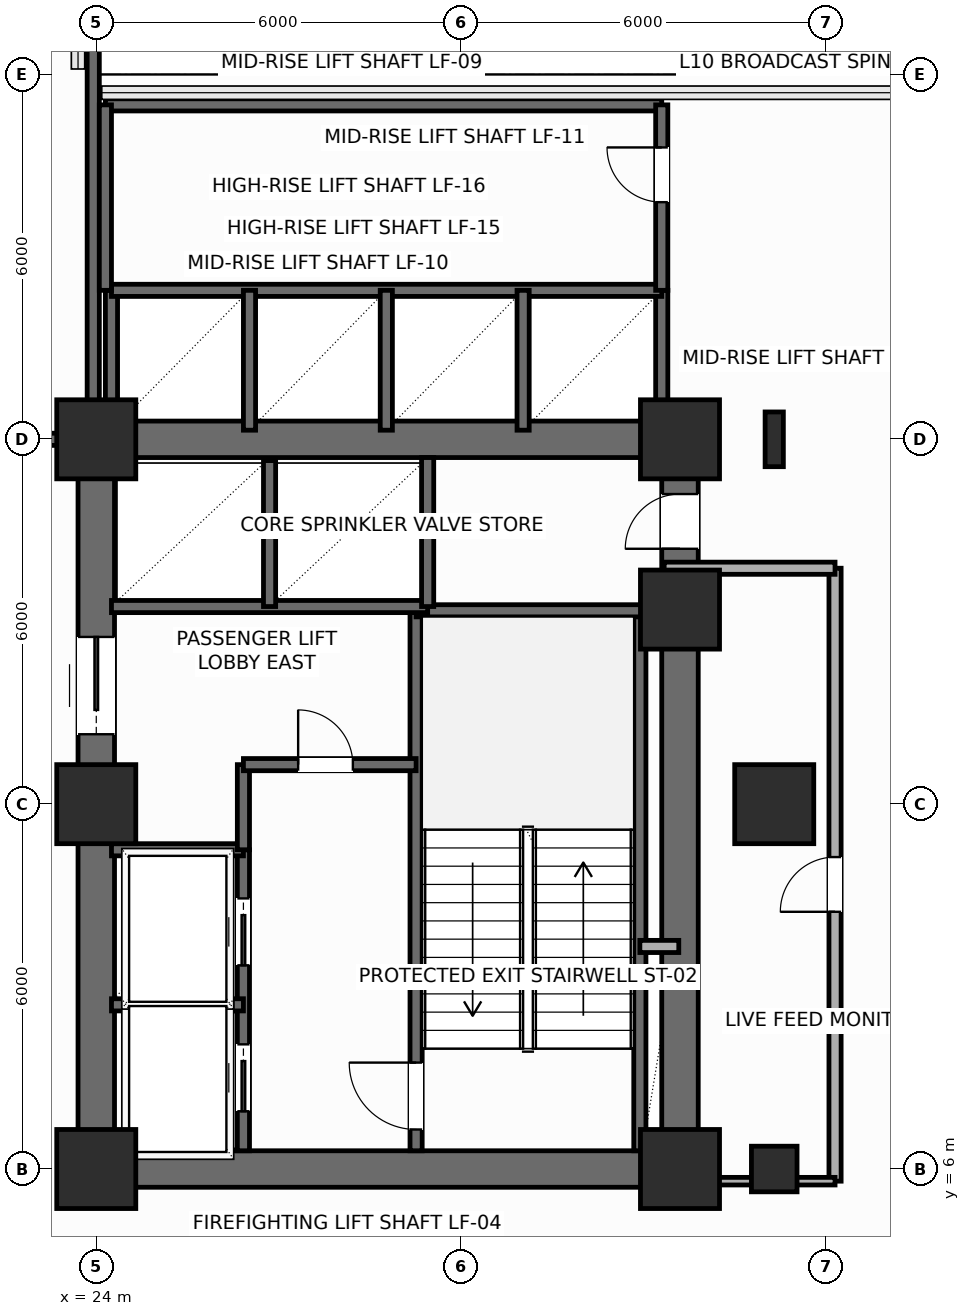
"""IFC4 building model, lengths in metres.
Left out: names, types, materials, properties, quantities, classifications, styles, units other than length and angle.
Written with IfcOpenShell. Run it as: python <this file> out.ifc"""

import sys

from ifc_helpers import new_model, si_unit, direction, frame, frame_2d, origin, origin_2d, place, context, subcontext, project, spatial, rectangle, hollow_rectangle, i_section, extrude, element, fill, save


model = new_model("IFC4")
c1 = context("Model", 3, precision=1e-05, world=origin(), true_north=direction((0.0, 1.0)))
c2 = subcontext(c1, "Body", "Model", "MODEL_VIEW")
j1 = project(units=[si_unit("LENGTHUNIT", "METRE"), si_unit("PLANEANGLEUNIT", "RADIAN")], contexts=[c1])
p1 = place(None, origin())
s1 = spatial("IfcSite", under=j1, at=p1, CompositionType="ELEMENT")
p2 = place(p1, origin())
s2 = spatial("IfcBuilding", under=s1, at=p2, CompositionType="ELEMENT")
p3 = place(p2, frame((0.0, 0.0, 48.0)))
s3 = spatial("IfcBuildingStorey", under=s2, at=p3, CompositionType="ELEMENT", Elevation=48.0)
for number, where, z_axis, x_axis in (
    (1, (24.0, 6.0, 0.0), (0.0, 0.0, 1.0), (1.0, 0.0, 0.0)),
    (2, (24.0, 12.0, 0.0), (0.0, 0.0, 1.0), (1.0, 0.0, 0.0)),
    (3, (24.0, 18.0, 0.0), (0.0, 0.0, 1.0), (1.0, 0.0, 0.0)),
    (4, (33.6, 6.0, 0.0), (0.0, 0.0, 1.0), (1.0, 0.0, 0.0)),
    (5, (33.6, 15.2, 0.0), (0.0, 0.0, 1.0), (1.0, 0.0, 0.0)),
    (6, (33.6, 18.0, 0.0), (0.0, 0.0, 1.0), (1.0, 0.0, 0.0)),
):
    element("IfcColumn", number, at=place(p3, frame(where, z_axis=z_axis, x_axis=x_axis)), inside=s3, PredefinedType="COLUMN", context=c2, shape_type="SweptSolid", body=[
        extrude(rectangle(XDim=1.3, YDim=1.3, at=origin_2d()), origin(), (0.0, 0.0, 1.0), 3.9),
    ])
p4 = place(p3, frame((35.15, 6.0, 0.0), z_axis=(0.0, 0.0, 1.0), x_axis=(1.0, 0.0, 0.0)))
e7 = element("IfcColumn", 7, at=p4, inside=s3, PredefinedType="COLUMN", context=c2, shape_type="SweptSolid", body=[
    extrude(hollow_rectangle(XDim=0.75, YDim=0.75, WallThickness=0.035, InnerFilletRadius=0.035, OuterFilletRadius=0.05, at=origin_2d()), origin(), (0.0, 0.0, 1.0), 3.9),
])
p5 = place(p3, frame((35.15, 12.0, 0.0), z_axis=(0.0, 0.0, 1.0), x_axis=(1.0, 0.0, 0.0)))
e8 = element("IfcColumn", 8, at=p5, inside=s3, PredefinedType="COLUMN", context=c2, shape_type="SweptSolid", body=[
    extrude(rectangle(XDim=1.3, YDim=1.3, at=origin_2d()), origin(), (0.0, 0.0, 1.0), 3.9),
])
p6 = place(p3, frame((35.15, 18.0, 0.0), z_axis=(0.0, 0.0, 1.0), x_axis=(1.0, 0.0, 0.0)))
e9 = element("IfcColumn", 9, at=p6, inside=s3, PredefinedType="COLUMN", context=c2, shape_type="SweptSolid", body=[
    extrude(i_section(OverallWidth=0.3, OverallDepth=0.9, WebThickness=0.019, FlangeThickness=0.035, FilletRadius=0.03, at=origin_2d()), origin(), (0.0, 0.0, 1.0), 3.9),
])
for number, where, z_axis, x_axis in (
    (10, (24.0, 6.0, 0.0), (0.0, 0.0, 1.0), (1.0, 0.0, 0.0)),
    (11, (24.0, 18.0, 0.0), (0.0, 0.0, 1.0), (1.0, 0.0, 0.0)),
):
    element("IfcWall", number, at=place(p3, frame(where, z_axis=z_axis, x_axis=x_axis)), inside=s3, PredefinedType="SHEAR", context=c2, shape_type="SweptSolid", body=[
        extrude(rectangle(XDim=9.6, YDim=0.6, at=frame_2d((4.8, 0.0))), origin(), (0.0, 0.0, 1.0), 3.65),
    ])
p7 = place(p3, frame((24.0, 6.0, 0.0), z_axis=(0.0, 0.0, 1.0), x_axis=(0.0, 1.0, 0.0)))
e12 = element("IfcWall", 12, at=p7, inside=s3, PredefinedType="SHEAR", context=c2, shape_type="SweptSolid", body=[
    extrude(rectangle(XDim=12.0, YDim=0.6, at=frame_2d((6.0, 0.0))), origin(), (0.0, 0.0, 1.0), 3.65),
])
p8 = place(p7, frame((7.15, 0.0, 0.0)))
e13 = element("IfcOpeningElement", 13, at=p8, cuts=e12, PredefinedType="OPENING", context=c2, shape_type="SweptSolid", body=[
    extrude(rectangle(XDim=1.6, YDim=2.3, at=frame_2d((0.8, 1.15))), frame((0.0, 0.31, 0.0), z_axis=(0.0, -1.0, 0.0), x_axis=(1.0, 0.0, 0.0)), (0.0, 0.0, 1.0), 0.62),
])
p9 = place(p3, frame((33.6, 6.0, 0.0), z_axis=(0.0, 0.0, 1.0), x_axis=(0.0, 1.0, 0.0)))
e14 = element("IfcWall", 14, at=p9, inside=s3, PredefinedType="SHEAR", context=c2, shape_type="SweptSolid", body=[
    extrude(rectangle(XDim=12.0, YDim=0.6, at=frame_2d((6.0, 0.0))), origin(), (0.0, 0.0, 1.0), 3.65),
])
p10 = place(p9, frame((10.2, 0.0, 0.0)))
e15 = element("IfcOpeningElement", 15, at=p10, cuts=e14, PredefinedType="OPENING", context=c2, shape_type="SweptSolid", body=[
    extrude(rectangle(XDim=0.9, YDim=2.15, at=frame_2d((0.45, 1.075))), frame((0.0, 0.31, 0.0), z_axis=(0.0, -1.0, 0.0), x_axis=(1.0, 0.0, 0.0)), (0.0, 0.0, 1.0), 0.62),
])
p11 = place(p3, frame((29.26, 6.3, 0.0), z_axis=(0.0, 0.0, 1.0), x_axis=(0.0, 1.0, 0.0)))
e16 = element("IfcWall", 16, at=p11, inside=s3, PredefinedType="SHEAR", context=c2, shape_type="SweptSolid", body=[
    extrude(rectangle(XDim=8.88, YDim=0.2, at=frame_2d((4.44, 0.0))), origin(), (0.0, 0.0, 1.0), 3.65),
])
p12 = place(p11, frame((0.35, 0.0, 0.0)))
e17 = element("IfcOpeningElement", 17, at=p12, cuts=e16, PredefinedType="OPENING", context=c2, shape_type="SweptSolid", body=[
    extrude(rectangle(XDim=1.1, YDim=2.2, at=frame_2d((0.55, 1.1))), frame((0.0, 0.11, 0.0), z_axis=(0.0, -1.0, 0.0), x_axis=(1.0, 0.0, 0.0)), (0.0, 0.0, 1.0), 0.22),
])
p13 = place(p3, frame((32.94, 6.3, 0.0), z_axis=(0.0, 0.0, 1.0), x_axis=(0.0, 1.0, 0.0)))
e18 = element("IfcWall", 18, at=p13, inside=s3, PredefinedType="SHEAR", context=c2, shape_type="SweptSolid", body=[
    extrude(rectangle(XDim=8.88, YDim=0.2, at=frame_2d((4.44, 0.0))), origin(), (0.0, 0.0, 1.0), 3.65),
])
p14 = place(p3, frame((29.26, 15.18, 0.0), z_axis=(0.0, 0.0, 1.0), x_axis=(1.0, 0.0, 0.0)))
e19 = element("IfcWall", 19, at=p14, inside=s3, PredefinedType="SHEAR", context=c2, shape_type="SweptSolid", body=[
    extrude(rectangle(XDim=4.04, YDim=0.2, at=frame_2d((2.02, 0.0))), origin(), (0.0, 0.0, 1.0), 3.65),
])
p15 = place(p3, frame((26.42, 6.3, 0.0), z_axis=(0.0, 0.0, 1.0), x_axis=(0.0, 1.0, 0.0)))
e20 = element("IfcWall", 20, at=p15, inside=s3, PredefinedType="SHEAR", context=c2, shape_type="SweptSolid", body=[
    extrude(rectangle(XDim=4.95, YDim=0.2, at=frame_2d((2.475, 0.0))), origin(), (0.0, 0.0, 1.0), 3.65),
])
p16 = place(p15, frame((0.65, 0.0, 0.0)))
e21 = element("IfcOpeningElement", 21, at=p16, cuts=e20, PredefinedType="OPENING", context=c2, shape_type="SweptSolid", body=[
    extrude(rectangle(XDim=1.1, YDim=2.2, at=frame_2d((0.55, 1.1))), frame((0.0, 0.11, 0.0), z_axis=(0.0, -1.0, 0.0), x_axis=(1.0, 0.0, 0.0)), (0.0, 0.0, 1.0), 0.22),
])
p17 = place(p15, frame((3.05, 0.0, 0.0)))
e22 = element("IfcOpeningElement", 22, at=p17, cuts=e20, PredefinedType="OPENING", context=c2, shape_type="SweptSolid", body=[
    extrude(rectangle(XDim=1.1, YDim=2.2, at=frame_2d((0.55, 1.1))), frame((0.0, 0.11, 0.0), z_axis=(0.0, -1.0, 0.0), x_axis=(1.0, 0.0, 0.0)), (0.0, 0.0, 1.0), 0.22),
])
for number, where, z_axis, x_axis in (
    (23, (24.25, 8.7, 0.0), (0.0, 0.0, 1.0), (1.0, 0.0, 0.0)),
    (24, (24.25, 11.25, 0.0), (0.0, 0.0, 1.0), (1.0, 0.0, 0.0)),
):
    element("IfcWall", number, at=place(p3, frame(where, z_axis=z_axis, x_axis=x_axis)), inside=s3, PredefinedType="SHEAR", context=c2, shape_type="SweptSolid", body=[
        extrude(rectangle(XDim=2.17, YDim=0.2, at=frame_2d((1.085, 0.0))), origin(), (0.0, 0.0, 1.0), 3.65),
    ])
p18 = place(p3, frame((26.42, 11.25, 0.0), z_axis=(0.0, 0.0, 1.0), x_axis=(0.0, 1.0, 0.0)))
e25 = element("IfcWall", 25, at=p18, inside=s3, PredefinedType="SHEAR", context=c2, shape_type="SweptSolid", body=[
    extrude(rectangle(XDim=1.4, YDim=0.2, at=frame_2d((0.7, 0.0))), origin(), (0.0, 0.0, 1.0), 3.65),
])
p19 = place(p3, frame((26.42, 12.65, 0.0), z_axis=(0.0, 0.0, 1.0), x_axis=(1.0, 0.0, 0.0)))
e26 = element("IfcWall", 26, at=p19, inside=s3, PredefinedType="SHEAR", context=c2, shape_type="SweptSolid", body=[
    extrude(rectangle(XDim=2.84, YDim=0.2, at=frame_2d((1.42, 0.0))), origin(), (0.0, 0.0, 1.0), 3.65),
])
p20 = place(p19, frame((0.9, 0.0, 0.0)))
e27 = element("IfcOpeningElement", 27, at=p20, cuts=e26, PredefinedType="OPENING", context=c2, shape_type="SweptSolid", body=[
    extrude(rectangle(XDim=0.9, YDim=2.15, at=frame_2d((0.45, 1.075))), frame((0.0, 0.11, 0.0), z_axis=(0.0, -1.0, 0.0), x_axis=(1.0, 0.0, 0.0)), (0.0, 0.0, 1.0), 0.22),
])
p21 = place(p3, frame((32.94, 9.66, 0.0), z_axis=(0.0, 0.0, 1.0), x_axis=(1.0, 0.0, 0.0)))
e28 = element("IfcWall", 28, at=p21, inside=s3, PredefinedType="SOLIDWALL", context=c2, shape_type="SweptSolid", body=[
    extrude(rectangle(XDim=0.64, YDim=0.2, at=frame_2d((0.32, 0.0))), origin(), (0.0, 0.0, 1.0), 3.65),
])
p22 = place(p3, frame((24.25, 15.25, 0.0), z_axis=(0.0, 0.0, 1.0), x_axis=(1.0, 0.0, 0.0)))
e29 = element("IfcWall", 29, at=p22, inside=s3, PredefinedType="SHEAR", context=c2, shape_type="SweptSolid", body=[
    extrude(rectangle(XDim=5.2, YDim=0.2, at=frame_2d((2.6, 0.0))), origin(), (0.0, 0.0, 1.0), 3.65),
])
p23 = place(p3, frame((26.85, 15.25, 0.0), z_axis=(0.0, 0.0, 1.0), x_axis=(0.0, 1.0, 0.0)))
e30 = element("IfcWall", 30, at=p23, inside=s3, PredefinedType="SHEAR", context=c2, shape_type="SweptSolid", body=[
    extrude(rectangle(XDim=2.4, YDim=0.2, at=frame_2d((1.2, 0.0))), origin(), (0.0, 0.0, 1.0), 3.65),
])
p24 = place(p3, frame((29.45, 15.25, 0.0), z_axis=(0.0, 0.0, 1.0), x_axis=(0.0, 1.0, 0.0)))
e31 = element("IfcWall", 31, at=p24, inside=s3, PredefinedType="SHEAR", context=c2, shape_type="SweptSolid", body=[
    extrude(rectangle(XDim=2.45, YDim=0.2, at=frame_2d((1.225, 0.0))), origin(), (0.0, 0.0, 1.0), 3.65),
])
p25 = place(p3, frame((20.45, 18.0, 0.0), z_axis=(0.0, 0.0, 1.0), x_axis=(1.0, 0.0, 0.0)))
e32 = element("IfcWall", 32, at=p25, inside=s3, PredefinedType="SHEAR", context=c2, shape_type="SweptSolid", body=[
    extrude(rectangle(XDim=3.5, YDim=0.2, at=frame_2d((1.75, 0.0))), origin(), (0.0, 0.0, 1.0), 3.65),
])
p26 = place(p25, frame((0.95, 0.0, 0.0)))
e33 = element("IfcOpeningElement", 33, at=p26, cuts=e32, PredefinedType="OPENING", context=c2, shape_type="SweptSolid", body=[
    extrude(rectangle(XDim=1.6, YDim=2.3, at=frame_2d((0.8, 1.15))), frame((0.0, 0.11, 0.0), z_axis=(0.0, -1.0, 0.0), x_axis=(1.0, 0.0, 0.0)), (0.0, 0.0, 1.0), 0.22),
])
p27 = place(p3, frame((23.95, 18.0, 0.0), z_axis=(0.0, 0.0, 1.0), x_axis=(0.0, 1.0, 0.0)))
e34 = element("IfcWall", 34, at=p27, inside=s3, PredefinedType="SHEAR", context=c2, shape_type="SweptSolid", body=[
    extrude(rectangle(XDim=9.3, YDim=0.2, at=frame_2d((4.65, 0.0))), origin(), (0.0, 0.0, 1.0), 3.65),
])
for number, where, z_axis, x_axis in (
    (35, (33.3, 18.1, 0.0), (0.0, 0.0, 1.0), (0.0, 1.0, 0.0)),
    (36, (24.25, 18.1, 0.0), (0.0, 0.0, 1.0), (0.0, 1.0, 0.0)),
):
    element("IfcWall", number, at=place(p3, frame(where, z_axis=z_axis, x_axis=x_axis)), inside=s3, PredefinedType="SHEAR", context=c2, shape_type="SweptSolid", body=[
        extrude(rectangle(XDim=2.35, YDim=0.2, at=frame_2d((1.175, 0.0))), origin(), (0.0, 0.0, 1.0), 3.65),
    ])
p28 = place(p3, frame((24.25, 20.45, 0.0), z_axis=(0.0, 0.0, 1.0), x_axis=(1.0, 0.0, 0.0)))
e37 = element("IfcWall", 37, at=p28, inside=s3, PredefinedType="SHEAR", context=c2, shape_type="SweptSolid", body=[
    extrude(rectangle(XDim=9.05, YDim=0.2, at=frame_2d((4.525, 0.0))), origin(), (0.0, 0.0, 1.0), 3.65),
])
for number, where, z_axis, x_axis in (
    (38, (26.52, 18.15, 0.0), (0.0, 0.0, 1.0), (0.0, 1.0, 0.0)),
    (39, (28.77, 18.15, 0.0), (0.0, 0.0, 1.0), (0.0, 1.0, 0.0)),
    (40, (31.02, 18.15, 0.0), (0.0, 0.0, 1.0), (0.0, 1.0, 0.0)),
):
    element("IfcWall", number, at=place(p3, frame(where, z_axis=z_axis, x_axis=x_axis)), inside=s3, PredefinedType="SHEAR", context=c2, shape_type="SweptSolid", body=[
        extrude(rectangle(XDim=2.3, YDim=0.2, at=frame_2d((1.15, 0.0))), origin(), (0.0, 0.0, 1.0), 3.65),
    ])
p29 = place(p3, frame((24.15, 23.5, 0.0), z_axis=(0.0, 0.0, 1.0), x_axis=(1.0, 0.0, 0.0)))
e41 = element("IfcWall", 41, at=p29, inside=s3, PredefinedType="SHEAR", context=c2, shape_type="SweptSolid", body=[
    extrude(rectangle(XDim=9.15, YDim=0.2, at=frame_2d((4.575, 0.0))), origin(), (0.0, 0.0, 1.0), 3.65),
])
p30 = place(p3, frame((33.3, 20.45, 0.0), z_axis=(0.0, 0.0, 1.0), x_axis=(0.0, 1.0, 0.0)))
e42 = element("IfcWall", 42, at=p30, inside=s3, PredefinedType="SHEAR", context=c2, shape_type="SweptSolid", body=[
    extrude(rectangle(XDim=3.05, YDim=0.2, at=frame_2d((1.525, 0.0))), origin(), (0.0, 0.0, 1.0), 3.65),
])
p31 = place(p30, frame((1.45, 0.0, 0.0)))
e43 = element("IfcOpeningElement", 43, at=p31, cuts=e42, PredefinedType="OPENING", context=c2, shape_type="SweptSolid", body=[
    extrude(rectangle(XDim=0.9, YDim=2.15, at=frame_2d((0.45, 1.075))), frame((0.0, 0.11, 0.0), z_axis=(0.0, -1.0, 0.0), x_axis=(1.0, 0.0, 0.0)), (0.0, 0.0, 1.0), 0.22),
])
p32 = place(p3, frame((24.15, 20.45, 0.0), z_axis=(0.0, 0.0, 1.0), x_axis=(0.0, 1.0, 0.0)))
e44 = element("IfcWall", 44, at=p32, inside=s3, PredefinedType="SHEAR", context=c2, shape_type="SweptSolid", body=[
    extrude(rectangle(XDim=3.05, YDim=0.2, at=frame_2d((1.525, 0.0))), origin(), (0.0, 0.0, 1.0), 3.65),
])
p33 = place(p3, frame((36.15, 5.8, 0.0), z_axis=(0.0, 0.0, 1.0), x_axis=(0.0, 1.0, 0.0)))
e45 = element("IfcWall", 45, at=p33, inside=s3, PredefinedType="PARTITIONING", context=c2, shape_type="SweptSolid", body=[
    extrude(rectangle(XDim=10.08, YDim=0.2, at=frame_2d((5.04, 0.0))), origin(), (0.0, 0.0, 1.0), 3.65),
])
p34 = place(p33, frame((4.43, 0.0, 0.0)))
e46 = element("IfcOpeningElement", 46, at=p34, cuts=e45, PredefinedType="OPENING", context=c2, shape_type="SweptSolid", body=[
    extrude(rectangle(XDim=0.9, YDim=2.1, at=frame_2d((0.45, 1.05))), frame((0.0, 0.11, 0.0), z_axis=(0.0, -1.0, 0.0), x_axis=(1.0, 0.0, 0.0)), (0.0, 0.0, 1.0), 0.22),
])
p35 = place(p3, frame((36.15, 15.88, 0.0), z_axis=(0.0, 0.0, 1.0), x_axis=(-1.0, 0.0, 0.0)))
e47 = element("IfcWall", 47, at=p35, inside=s3, PredefinedType="PARTITIONING", context=c2, shape_type="SweptSolid", body=[
    extrude(rectangle(XDim=2.81, YDim=0.2, at=frame_2d((1.405, 0.0))), origin(), (0.0, 0.0, 1.0), 3.65),
])
p36 = place(p3, frame((33.65, 5.8, 0.0), z_axis=(0.0, 0.0, 1.0), x_axis=(1.0, 0.0, 0.0)))
e48 = element("IfcWall", 48, at=p36, inside=s3, PredefinedType="PARTITIONING", context=c2, shape_type="SweptSolid", body=[
    extrude(rectangle(XDim=2.5, YDim=0.125, at=frame_2d((1.25, 0.0))), origin(), (0.0, 0.0, 1.0), 2.992),
])
p37 = place(p8, origin())
e49 = element("IfcDoor", 49, at=p37, inside=s3, OperationType="DOUBLE_DOOR_SLIDING", PredefinedType="DOOR", context=c2, shape_type="SweptSolid", body=[
    extrude(rectangle(XDim=1.6, YDim=2.3, at=frame_2d((0.8, 1.15))), frame((0.0, 0.025, 0.0), z_axis=(0.0, -1.0, 0.0), x_axis=(1.0, 0.0, 0.0)), (0.0, 0.0, 1.0), 0.05),
])
fill(e13, e49)
p38 = place(p10, origin())
e50 = element("IfcDoor", 50, at=p38, inside=s3, OperationType="SINGLE_SWING_LEFT", PredefinedType="DOOR", context=c2, shape_type="SweptSolid", body=[
    extrude(rectangle(XDim=0.9, YDim=2.15, at=frame_2d((0.45, 1.075))), frame((0.0, 0.025, 0.0), z_axis=(0.0, -1.0, 0.0), x_axis=(1.0, 0.0, 0.0)), (0.0, 0.0, 1.0), 0.05),
])
fill(e15, e50)
p39 = place(p12, origin())
e51 = element("IfcDoor", 51, at=p39, inside=s3, OperationType="SINGLE_SWING_RIGHT", PredefinedType="DOOR", context=c2, shape_type="SweptSolid", body=[
    extrude(rectangle(XDim=1.1, YDim=2.2, at=frame_2d((0.55, 1.1))), frame((0.0, 0.025, 0.0), z_axis=(0.0, -1.0, 0.0), x_axis=(1.0, 0.0, 0.0)), (0.0, 0.0, 1.0), 0.05),
])
fill(e17, e51)
p40 = place(p16, origin())
e52 = element("IfcDoor", 52, at=p40, inside=s3, OperationType="SLIDING_TO_LEFT", PredefinedType="DOOR", context=c2, shape_type="SweptSolid", body=[
    extrude(rectangle(XDim=1.1, YDim=2.2, at=frame_2d((0.55, 1.1))), frame((0.0, 0.025, 0.0), z_axis=(0.0, -1.0, 0.0), x_axis=(1.0, 0.0, 0.0)), (0.0, 0.0, 1.0), 0.05),
])
fill(e21, e52)
p41 = place(p17, origin())
e53 = element("IfcDoor", 53, at=p41, inside=s3, OperationType="SLIDING_TO_LEFT", PredefinedType="DOOR", context=c2, shape_type="SweptSolid", body=[
    extrude(rectangle(XDim=1.1, YDim=2.2, at=frame_2d((0.55, 1.1))), frame((0.0, 0.025, 0.0), z_axis=(0.0, -1.0, 0.0), x_axis=(1.0, 0.0, 0.0)), (0.0, 0.0, 1.0), 0.05),
])
fill(e22, e53)
p42 = place(p20, origin())
e54 = element("IfcDoor", 54, at=p42, inside=s3, OperationType="SINGLE_SWING_LEFT", PredefinedType="DOOR", context=c2, shape_type="SweptSolid", body=[
    extrude(rectangle(XDim=0.9, YDim=2.15, at=frame_2d((0.45, 1.075))), frame((0.0, 0.025, 0.0), z_axis=(0.0, -1.0, 0.0), x_axis=(1.0, 0.0, 0.0)), (0.0, 0.0, 1.0), 0.05),
])
fill(e27, e54)
p43 = place(p31, origin())
e55 = element("IfcDoor", 55, at=p43, inside=s3, OperationType="SINGLE_SWING_RIGHT", PredefinedType="DOOR", context=c2, shape_type="SweptSolid", body=[
    extrude(rectangle(XDim=0.9, YDim=2.15, at=frame_2d((0.45, 1.075))), frame((0.0, 0.025, 0.0), z_axis=(0.0, -1.0, 0.0), x_axis=(1.0, 0.0, 0.0)), (0.0, 0.0, 1.0), 0.05),
])
fill(e43, e55)
p44 = place(p34, origin())
e56 = element("IfcDoor", 56, at=p44, inside=s3, OperationType="SINGLE_SWING_LEFT", PredefinedType="DOOR", context=c2, shape_type="SweptSolid", body=[
    extrude(rectangle(XDim=0.9, YDim=2.1, at=frame_2d((0.45, 1.05))), frame((0.0, 0.025, 0.0), z_axis=(0.0, -1.0, 0.0), x_axis=(1.0, 0.0, 0.0)), (0.0, 0.0, 1.0), 0.05),
])
fill(e46, e56)
save(model, sys.argv[1])
